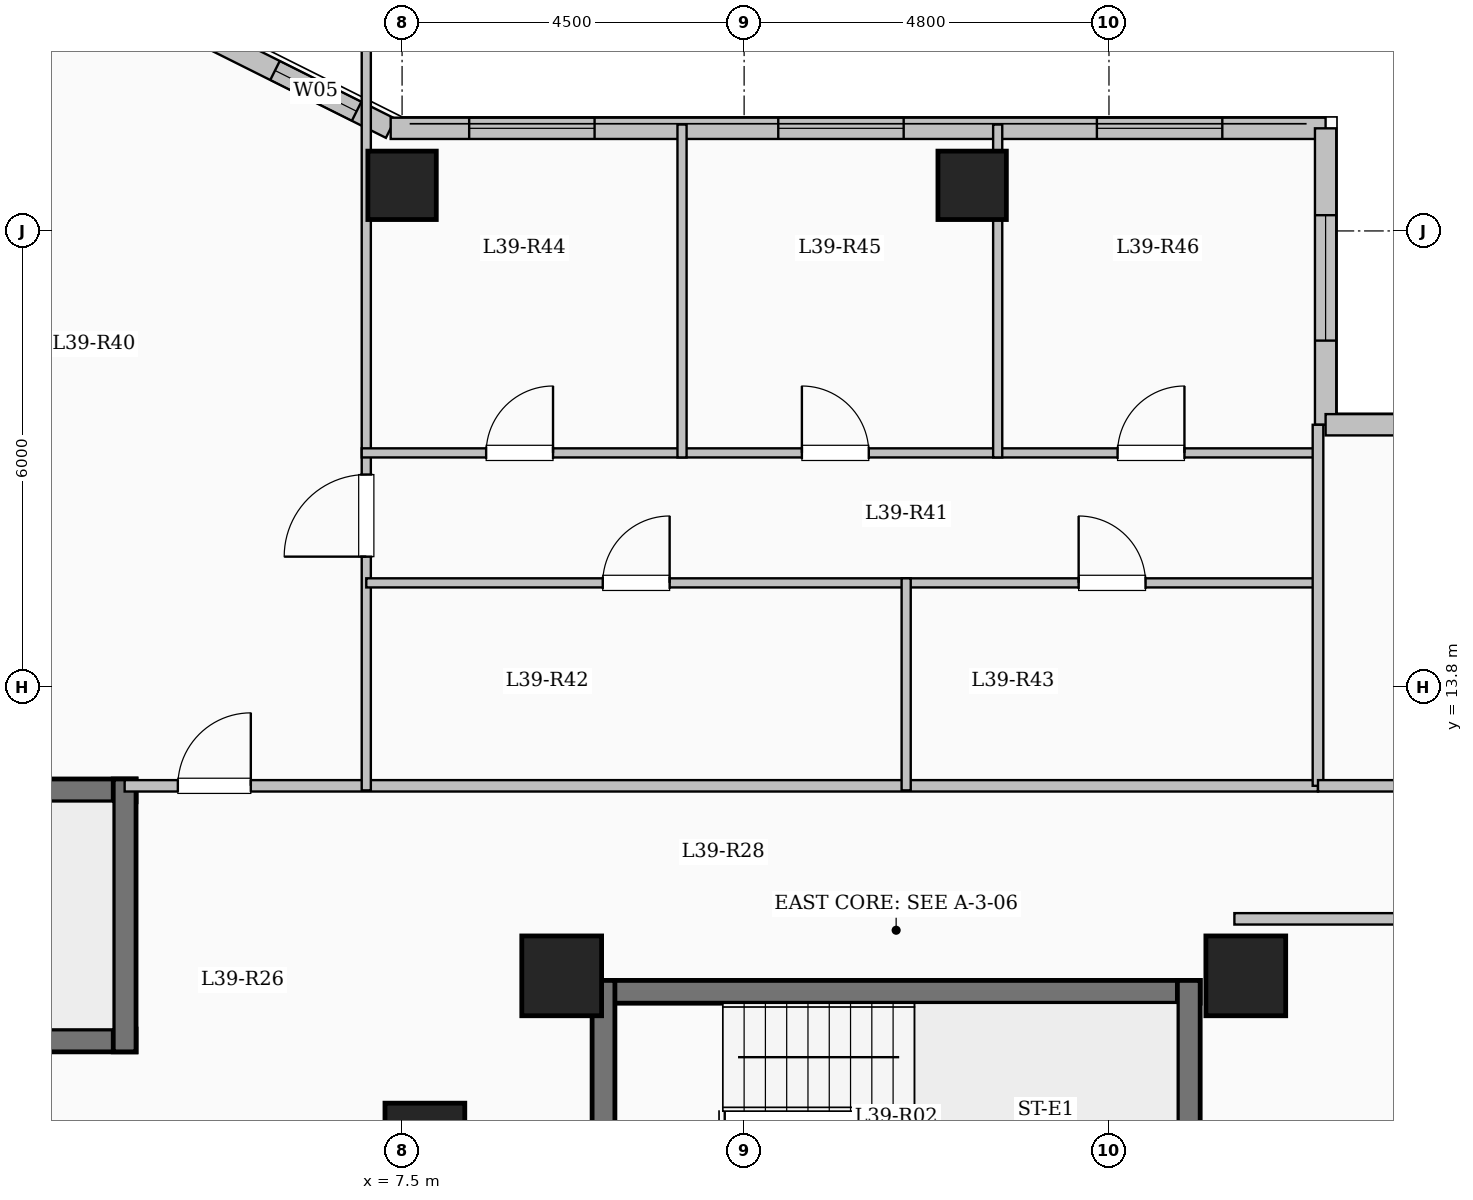
"""IFC4 building model, lengths in metres.
Left out: names, types, materials, properties, quantities, classifications, styles, units other than length and angle.
Written with IfcOpenShell. Run it as: python <this file> out.ifc"""

import sys

from ifc_helpers import new_model, si_unit, direction, frame, frame_2d, origin, origin_2d, place, context, subcontext, project, spatial, rectangle, extrude, element, fill, save


model = new_model("IFC4")
c1 = context("Model", 3, precision=1e-05, world=origin(), true_north=direction((0.0, 1.0)))
c2 = subcontext(c1, "Body", "Model", "MODEL_VIEW")
j1 = project(units=[si_unit("LENGTHUNIT", "METRE"), si_unit("PLANEANGLEUNIT", "RADIAN")], contexts=[c1])
p1 = place(None, origin())
s1 = spatial("IfcSite", under=j1, at=p1, CompositionType="ELEMENT")
p2 = place(p1, origin())
s2 = spatial("IfcBuilding", under=s1, at=p2, CompositionType="ELEMENT")
p3 = place(p2, frame((0.0, 0.0, 146.0)))
s3 = spatial("IfcBuildingStorey", under=s2, at=p3, CompositionType="ELEMENT", Elevation=146.0)
for number, where, z_axis, x_axis in (
    (1, (7.8, 7.8, 0.0), (0.0, 0.0, 1.0), (1.0, 0.0, 0.0)),
    (2, (9.6, 10.0, 0.0), (0.0, 0.0, 1.0), (1.0, 0.0, 0.0)),
    (3, (18.6, 10.0, 0.0), (0.0, 0.0, 1.0), (1.0, 0.0, 0.0)),
):
    element("IfcColumn", number, at=place(p3, frame(where, z_axis=z_axis, x_axis=x_axis)), inside=s3, PredefinedType="COLUMN", context=c2, shape_type="SweptSolid", body=[
        extrude(rectangle(XDim=1.05, YDim=1.05, at=origin_2d()), origin(), (0.0, 0.0, 1.0), 3.35),
    ])
for number, where, z_axis, x_axis in (
    (4, (7.5, 20.4, 0.0), (0.0, 0.0, 1.0), (1.0, 0.0, 0.0)),
    (5, (15.0, 20.4, 0.0), (0.0, 0.0, 1.0), (1.0, 0.0, 0.0)),
):
    element("IfcColumn", number, at=place(p3, frame(where, z_axis=z_axis, x_axis=x_axis)), inside=s3, PredefinedType="COLUMN", context=c2, shape_type="SweptSolid", body=[
        extrude(rectangle(XDim=0.9, YDim=0.9, at=origin_2d()), origin(), (0.0, 0.0, 1.0), 3.35),
    ])
p4 = place(p3, frame((4.35, 22.65, 0.0), z_axis=(0.0, 0.0, 1.0), x_axis=(0.894427191, -0.4472135955, 0.0)))
e6 = element("IfcWall", 6, at=p4, inside=s3, PredefinedType="SOLIDWALL", context=c2, shape_type="SweptSolid", body=[
    extrude(rectangle(XDim=3.354, YDim=0.28, at=frame_2d((1.677, 0.0))), origin(), (0.0, 0.0, 1.0), 3.1),
])
p5 = place(p4, frame((1.653, 0.0, 0.95)))
e7 = element("IfcOpeningElement", 7, at=p5, cuts=e6, PredefinedType="OPENING", context=c2, shape_type="SweptSolid", body=[
    extrude(rectangle(XDim=1.2, YDim=1.5, at=frame_2d((0.6, 0.75))), frame((0.0, 0.15, 0.0), z_axis=(0.0, -1.0, 0.0), x_axis=(1.0, 0.0, 0.0)), (0.0, 0.0, 1.0), 0.3),
])
p6 = place(p3, frame((7.35, 21.15, 0.0), z_axis=(0.0, 0.0, 1.0), x_axis=(1.0, 0.0, 0.0)))
e8 = element("IfcWall", 8, at=p6, inside=s3, PredefinedType="SOLIDWALL", context=c2, shape_type="SweptSolid", body=[
    extrude(rectangle(XDim=12.3, YDim=0.28, at=frame_2d((6.15, 0.0))), origin(), (0.0, 0.0, 1.0), 3.1),
])
p7 = place(p6, frame((1.033, 0.0, 0.9)))
e9 = element("IfcOpeningElement", 9, at=p7, cuts=e8, PredefinedType="OPENING", context=c2, shape_type="SweptSolid", body=[
    extrude(rectangle(XDim=1.65, YDim=1.6, at=frame_2d((0.825, 0.8))), frame((0.0, 0.15, 0.0), z_axis=(0.0, -1.0, 0.0), x_axis=(1.0, 0.0, 0.0)), (0.0, 0.0, 1.0), 0.3),
])
p8 = place(p6, frame((5.099, 0.0, 0.9)))
e10 = element("IfcOpeningElement", 10, at=p8, cuts=e8, PredefinedType="OPENING", context=c2, shape_type="SweptSolid", body=[
    extrude(rectangle(XDim=1.65, YDim=1.6, at=frame_2d((0.825, 0.8))), frame((0.0, 0.15, 0.0), z_axis=(0.0, -1.0, 0.0), x_axis=(1.0, 0.0, 0.0)), (0.0, 0.0, 1.0), 0.3),
])
p9 = place(p6, frame((9.291, 0.0, 0.9)))
e11 = element("IfcOpeningElement", 11, at=p9, cuts=e8, PredefinedType="OPENING", context=c2, shape_type="SweptSolid", body=[
    extrude(rectangle(XDim=1.65, YDim=1.6, at=frame_2d((0.825, 0.8))), frame((0.0, 0.15, 0.0), z_axis=(0.0, -1.0, 0.0), x_axis=(1.0, 0.0, 0.0)), (0.0, 0.0, 1.0), 0.3),
])
p10 = place(p3, frame((19.65, 21.15, 0.0), z_axis=(0.0, 0.0, 1.0), x_axis=(0.0, -1.0, 0.0)))
e12 = element("IfcWall", 12, at=p10, inside=s3, PredefinedType="SOLIDWALL", context=c2, shape_type="SweptSolid", body=[
    extrude(rectangle(XDim=3.9, YDim=0.28, at=frame_2d((1.95, 0.0))), origin(), (0.0, 0.0, 1.0), 3.1),
])
p11 = place(p10, frame((1.143, 0.0, 0.9)))
e13 = element("IfcOpeningElement", 13, at=p11, cuts=e12, PredefinedType="OPENING", context=c2, shape_type="SweptSolid", body=[
    extrude(rectangle(XDim=1.65, YDim=1.6, at=frame_2d((0.825, 0.8))), frame((0.0, 0.15, 0.0), z_axis=(0.0, -1.0, 0.0), x_axis=(1.0, 0.0, 0.0)), (0.0, 0.0, 1.0), 0.3),
])
p12 = place(p3, frame((19.65, 17.25, 0.0), z_axis=(0.0, 0.0, 1.0), x_axis=(1.0, 0.0, 0.0)))
e14 = element("IfcWall", 14, at=p12, inside=s3, PredefinedType="SOLIDWALL", context=c2, shape_type="SweptSolid", body=[
    extrude(rectangle(XDim=5.4, YDim=0.28, at=frame_2d((2.7, 0.0))), origin(), (0.0, 0.0, 1.0), 3.1),
])
p13 = place(p12, frame((1.675, 0.0, 0.9)))
e15 = element("IfcOpeningElement", 15, at=p13, cuts=e14, PredefinedType="OPENING", context=c2, shape_type="SweptSolid", body=[
    extrude(rectangle(XDim=2.0, YDim=1.7, at=frame_2d((1.0, 0.85))), frame((0.0, 0.15, 0.0), z_axis=(0.0, -1.0, 0.0), x_axis=(1.0, 0.0, 0.0)), (0.0, 0.0, 1.0), 0.3),
])
p14 = place(p3, frame((10.0, 9.79, 0.0), z_axis=(0.0, 0.0, 1.0), x_axis=(1.0, 0.0, 0.0)))
e16 = element("IfcWall", 16, at=p14, inside=s3, PredefinedType="SHEAR", context=c2, shape_type="SweptSolid", body=[
    extrude(rectangle(XDim=8.0, YDim=0.3, at=frame_2d((4.0, 0.0))), origin(), (0.0, 0.0, 1.0), 3.35),
])
for number, where, z_axis, x_axis in (
    (17, (10.15, 6.35, 0.0), (0.0, 0.0, 1.0), (0.0, 1.0, 0.0)),
    (18, (17.85, 6.35, 0.0), (0.0, 0.0, 1.0), (0.0, 1.0, 0.0)),
):
    element("IfcWall", number, at=place(p3, frame(where, z_axis=z_axis, x_axis=x_axis)), inside=s3, PredefinedType="SHEAR", context=c2, shape_type="SweptSolid", body=[
        extrude(rectangle(XDim=3.59, YDim=0.3, at=frame_2d((1.795, 0.0))), origin(), (0.0, 0.0, 1.0), 3.35),
    ])
p15 = place(p3, frame((-4.0, 12.44, 0.0), z_axis=(0.0, 0.0, 1.0), x_axis=(1.0, 0.0, 0.0)))
e19 = element("IfcWall", 19, at=p15, inside=s3, PredefinedType="SHEAR", context=c2, shape_type="SweptSolid", body=[
    extrude(rectangle(XDim=8.0, YDim=0.3, at=frame_2d((4.0, 0.0))), origin(), (0.0, 0.0, 1.0), 3.35),
])
p16 = place(p3, frame((-4.0, 9.15, 0.0), z_axis=(0.0, 0.0, 1.0), x_axis=(1.0, 0.0, 0.0)))
e20 = element("IfcWall", 20, at=p16, inside=s3, PredefinedType="SHEAR", context=c2, shape_type="SweptSolid", body=[
    extrude(rectangle(XDim=8.0, YDim=0.3, at=frame_2d((4.0, 0.0))), origin(), (0.0, 0.0, 1.0), 3.35),
])
p17 = place(p16, frame((0.55, 0.0, 0.0)))
e21 = element("IfcOpeningElement", 21, at=p17, cuts=e20, PredefinedType="OPENING", context=c2, shape_type="SweptSolid", body=[
    extrude(rectangle(XDim=1.0, YDim=2.15, at=frame_2d((0.5, 1.075))), frame((0.0, 0.16, 0.0), z_axis=(0.0, -1.0, 0.0), x_axis=(1.0, 0.0, 0.0)), (0.0, 0.0, 1.0), 0.32),
])
p18 = place(p3, frame((3.85, 9.0, 0.0), z_axis=(0.0, 0.0, 1.0), x_axis=(0.0, 1.0, 0.0)))
e22 = element("IfcWall", 22, at=p18, inside=s3, PredefinedType="SHEAR", context=c2, shape_type="SweptSolid", body=[
    extrude(rectangle(XDim=3.59, YDim=0.3, at=frame_2d((1.795, 0.0))), origin(), (0.0, 0.0, 1.0), 3.35),
])
p19 = place(p3, frame((3.85, 12.5, 0.0), z_axis=(0.0, 0.0, 1.0), x_axis=(1.0, 0.0, 0.0)))
e23 = element("IfcWall", 23, at=p19, inside=s3, PredefinedType="PARTITIONING", context=c2, shape_type="SweptSolid", body=[
    extrude(rectangle(XDim=15.7, YDim=0.15, at=frame_2d((7.85, 0.0))), origin(), (0.0, 0.0, 1.0), 3.1),
])
p20 = place(p19, frame((0.7, 0.0, 0.0)))
e24 = element("IfcOpeningElement", 24, at=p20, cuts=e23, PredefinedType="OPENING", context=c2, shape_type="SweptSolid", body=[
    extrude(rectangle(XDim=0.96, YDim=2.15, at=frame_2d((0.48, 1.075))), frame((0.0, 0.085, 0.0), z_axis=(0.0, -1.0, 0.0), x_axis=(1.0, 0.0, 0.0)), (0.0, 0.0, 1.0), 0.17),
])
p21 = place(p3, frame((7.029, 12.44, 0.0), z_axis=(0.0, 0.0, 1.0), x_axis=(0.0, 1.0, 0.0)))
e25 = element("IfcWall", 25, at=p21, inside=s3, PredefinedType="PARTITIONING", context=c2, shape_type="SweptSolid", body=[
    extrude(rectangle(XDim=9.74, YDim=0.12, at=frame_2d((4.87, 0.0))), origin(), (0.0, 0.0, 1.0), 3.1),
])
p22 = place(p21, frame((3.075, 0.0, 0.0)))
e26 = element("IfcOpeningElement", 26, at=p22, cuts=e25, PredefinedType="OPENING", context=c2, shape_type="SweptSolid", body=[
    extrude(rectangle(XDim=1.08, YDim=2.15, at=frame_2d((0.54, 1.075))), frame((0.0, 0.07, 0.0), z_axis=(0.0, -1.0, 0.0), x_axis=(1.0, 0.0, 0.0)), (0.0, 0.0, 1.0), 0.14),
])
p23 = place(p3, frame((7.029, 15.17, 0.0), z_axis=(0.0, 0.0, 1.0), x_axis=(1.0, 0.0, 0.0)))
e27 = element("IfcWall", 27, at=p23, inside=s3, PredefinedType="PARTITIONING", context=c2, shape_type="SweptSolid", body=[
    extrude(rectangle(XDim=7.103, YDim=0.12, at=frame_2d((3.552, 0.0))), origin(), (0.0, 0.0, 1.0), 3.1),
])
p24 = place(p23, frame((3.111, 0.0, 0.0)))
e28 = element("IfcOpeningElement", 28, at=p24, cuts=e27, PredefinedType="OPENING", context=c2, shape_type="SweptSolid", body=[
    extrude(rectangle(XDim=0.88, YDim=2.1, at=frame_2d((0.44, 1.05))), frame((0.0, 0.07, 0.0), z_axis=(0.0, -1.0, 0.0), x_axis=(1.0, 0.0, 0.0)), (0.0, 0.0, 1.0), 0.14),
])
p25 = place(p3, frame((14.132, 15.17, 0.0), z_axis=(0.0, 0.0, 1.0), x_axis=(1.0, 0.0, 0.0)))
e29 = element("IfcWall", 29, at=p25, inside=s3, PredefinedType="PARTITIONING", context=c2, shape_type="SweptSolid", body=[
    extrude(rectangle(XDim=5.418, YDim=0.12, at=frame_2d((2.709, 0.0))), origin(), (0.0, 0.0, 1.0), 3.1),
])
p26 = place(p25, frame((2.269, 0.0, 0.0)))
e30 = element("IfcOpeningElement", 30, at=p26, cuts=e29, PredefinedType="OPENING", context=c2, shape_type="SweptSolid", body=[
    extrude(rectangle(XDim=0.88, YDim=2.1, at=frame_2d((0.44, 1.05))), frame((0.0, 0.07, 0.0), z_axis=(0.0, -1.0, 0.0), x_axis=(1.0, 0.0, 0.0)), (0.0, 0.0, 1.0), 0.14),
])
p27 = place(p3, frame((6.969, 16.88, 0.0), z_axis=(0.0, 0.0, 1.0), x_axis=(1.0, 0.0, 0.0)))
e31 = element("IfcWall", 31, at=p27, inside=s3, PredefinedType="PARTITIONING", context=c2, shape_type="SweptSolid", body=[
    extrude(rectangle(XDim=12.641, YDim=0.12, at=frame_2d((6.321, 0.0))), origin(), (0.0, 0.0, 1.0), 2.685),
])
p28 = place(p27, frame((1.637, 0.0, 0.0)))
e32 = element("IfcOpeningElement", 32, at=p28, cuts=e31, PredefinedType="OPENING", context=c2, shape_type="SweptSolid", body=[
    extrude(rectangle(XDim=0.88, YDim=2.1, at=frame_2d((0.44, 1.05))), frame((0.0, 0.07, 0.0), z_axis=(0.0, -1.0, 0.0), x_axis=(1.0, 0.0, 0.0)), (0.0, 0.0, 1.0), 0.14),
])
p29 = place(p27, frame((5.791, 0.0, 0.0)))
e33 = element("IfcOpeningElement", 33, at=p29, cuts=e31, PredefinedType="OPENING", context=c2, shape_type="SweptSolid", body=[
    extrude(rectangle(XDim=0.88, YDim=2.1, at=frame_2d((0.44, 1.05))), frame((0.0, 0.07, 0.0), z_axis=(0.0, -1.0, 0.0), x_axis=(1.0, 0.0, 0.0)), (0.0, 0.0, 1.0), 0.14),
])
p30 = place(p27, frame((9.944, 0.0, 0.0)))
e34 = element("IfcOpeningElement", 34, at=p30, cuts=e31, PredefinedType="OPENING", context=c2, shape_type="SweptSolid", body=[
    extrude(rectangle(XDim=0.88, YDim=2.1, at=frame_2d((0.44, 1.05))), frame((0.0, 0.07, 0.0), z_axis=(0.0, -1.0, 0.0), x_axis=(1.0, 0.0, 0.0)), (0.0, 0.0, 1.0), 0.14),
])
p31 = place(p3, frame((14.132, 12.44, 0.0), z_axis=(0.0, 0.0, 1.0), x_axis=(0.0, 1.0, 0.0)))
e35 = element("IfcWall", 35, at=p31, inside=s3, PredefinedType="PARTITIONING", context=c2, shape_type="SweptSolid", body=[
    extrude(rectangle(XDim=2.79, YDim=0.12, at=frame_2d((1.395, 0.0))), origin(), (0.0, 0.0, 1.0), 3.1),
])
for number, where, z_axis, x_axis in (
    (36, (11.183, 16.82, 0.0), (0.0, 0.0, 1.0), (0.0, 1.0, 0.0)),
    (37, (15.336, 16.82, 0.0), (0.0, 0.0, 1.0), (0.0, 1.0, 0.0)),
):
    element("IfcWall", number, at=place(p3, frame(where, z_axis=z_axis, x_axis=x_axis)), inside=s3, PredefinedType="PARTITIONING", context=c2, shape_type="SweptSolid", body=[
        extrude(rectangle(XDim=4.38, YDim=0.12, at=frame_2d((2.19, 0.0))), origin(), (0.0, 0.0, 1.0), 3.1),
    ])
p32 = place(p3, frame((18.45, 10.75, 0.0), z_axis=(0.0, 0.0, 1.0), x_axis=(1.0, 0.0, 0.0)))
e38 = element("IfcWall", 38, at=p32, inside=s3, PredefinedType="PARTITIONING", context=c2, shape_type="SweptSolid", body=[
    extrude(rectangle(XDim=6.63, YDim=0.15, at=frame_2d((3.315, 0.0))), origin(), (0.0, 0.0, 1.0), 3.1),
])
p33 = place(p3, frame((19.55, 12.5, 0.0), z_axis=(0.0, 0.0, 1.0), x_axis=(0.0, 1.0, 0.0)))
e39 = element("IfcWall", 39, at=p33, inside=s3, PredefinedType="PARTITIONING", context=c2, shape_type="SweptSolid", body=[
    extrude(rectangle(XDim=4.75, YDim=0.14, at=frame_2d((2.375, 0.0))), origin(), (0.0, 0.0, 1.0), 3.1),
])
p34 = place(p3, frame((19.55, 12.5, 0.0), z_axis=(0.0, 0.0, 1.0), x_axis=(1.0, 0.0, 0.0)))
e40 = element("IfcWall", 40, at=p34, inside=s3, PredefinedType="PARTITIONING", context=c2, shape_type="SweptSolid", body=[
    extrude(rectangle(XDim=5.53, YDim=0.15, at=frame_2d((2.765, 0.0))), origin(), (0.0, 0.0, 1.0), 3.1),
])
p35 = place(p34, frame((2.29, 0.0, 0.0)))
e41 = element("IfcOpeningElement", 41, at=p35, cuts=e40, PredefinedType="OPENING", context=c2, shape_type="SweptSolid", body=[
    extrude(rectangle(XDim=0.95, YDim=2.15, at=frame_2d((0.475, 1.075))), frame((0.0, 0.085, 0.0), z_axis=(0.0, -1.0, 0.0), x_axis=(1.0, 0.0, 0.0)), (0.0, 0.0, 1.0), 0.17),
])
p36 = place(p5, origin())
e42 = element("IfcWindow", 42, at=p36, inside=s3, PartitioningType="SINGLE_PANEL", PredefinedType="WINDOW", context=c2, shape_type="SweptSolid", body=[
    extrude(rectangle(XDim=1.2, YDim=1.5, at=frame_2d((0.6, 0.75))), frame((0.0, 0.03, 0.0), z_axis=(0.0, -1.0, 0.0), x_axis=(1.0, 0.0, 0.0)), (0.0, 0.0, 1.0), 0.06),
])
fill(e7, e42)
p37 = place(p7, origin())
e43 = element("IfcWindow", 43, at=p37, inside=s3, PartitioningType="SINGLE_PANEL", PredefinedType="WINDOW", context=c2, shape_type="SweptSolid", body=[
    extrude(rectangle(XDim=1.65, YDim=1.6, at=frame_2d((0.825, 0.8))), frame((0.0, 0.03, 0.0), z_axis=(0.0, -1.0, 0.0), x_axis=(1.0, 0.0, 0.0)), (0.0, 0.0, 1.0), 0.06),
])
fill(e9, e43)
p38 = place(p8, origin())
e44 = element("IfcWindow", 44, at=p38, inside=s3, PartitioningType="SINGLE_PANEL", PredefinedType="WINDOW", context=c2, shape_type="SweptSolid", body=[
    extrude(rectangle(XDim=1.65, YDim=1.6, at=frame_2d((0.825, 0.8))), frame((0.0, 0.03, 0.0), z_axis=(0.0, -1.0, 0.0), x_axis=(1.0, 0.0, 0.0)), (0.0, 0.0, 1.0), 0.06),
])
fill(e10, e44)
p39 = place(p9, origin())
e45 = element("IfcWindow", 45, at=p39, inside=s3, PartitioningType="SINGLE_PANEL", PredefinedType="WINDOW", context=c2, shape_type="SweptSolid", body=[
    extrude(rectangle(XDim=1.65, YDim=1.6, at=frame_2d((0.825, 0.8))), frame((0.0, 0.03, 0.0), z_axis=(0.0, -1.0, 0.0), x_axis=(1.0, 0.0, 0.0)), (0.0, 0.0, 1.0), 0.06),
])
fill(e11, e45)
p40 = place(p11, origin())
e46 = element("IfcWindow", 46, at=p40, inside=s3, PartitioningType="SINGLE_PANEL", PredefinedType="WINDOW", context=c2, shape_type="SweptSolid", body=[
    extrude(rectangle(XDim=1.65, YDim=1.6, at=frame_2d((0.825, 0.8))), frame((0.0, 0.03, 0.0), z_axis=(0.0, -1.0, 0.0), x_axis=(1.0, 0.0, 0.0)), (0.0, 0.0, 1.0), 0.06),
])
fill(e13, e46)
p41 = place(p20, origin())
e47 = element("IfcDoor", 47, at=p41, inside=s3, OperationType="SINGLE_SWING_RIGHT", PredefinedType="DOOR", context=c2, shape_type="SweptSolid", body=[
    extrude(rectangle(XDim=0.96, YDim=2.15, at=frame_2d((0.48, 1.075))), frame((0.0, 0.025, 0.0), z_axis=(0.0, -1.0, 0.0), x_axis=(1.0, 0.0, 0.0)), (0.0, 0.0, 1.0), 0.05),
])
fill(e24, e47)
p42 = place(p22, origin())
e48 = element("IfcDoor", 48, at=p42, inside=s3, OperationType="SINGLE_SWING_LEFT", PredefinedType="DOOR", context=c2, shape_type="SweptSolid", body=[
    extrude(rectangle(XDim=1.08, YDim=2.15, at=frame_2d((0.54, 1.075))), frame((0.0, 0.025, 0.0), z_axis=(0.0, -1.0, 0.0), x_axis=(1.0, 0.0, 0.0)), (0.0, 0.0, 1.0), 0.05),
])
fill(e26, e48)
p43 = place(p24, origin())
e49 = element("IfcDoor", 49, at=p43, inside=s3, OperationType="SINGLE_SWING_RIGHT", PredefinedType="DOOR", context=c2, shape_type="SweptSolid", body=[
    extrude(rectangle(XDim=0.88, YDim=2.1, at=frame_2d((0.44, 1.05))), frame((0.0, 0.025, 0.0), z_axis=(0.0, -1.0, 0.0), x_axis=(1.0, 0.0, 0.0)), (0.0, 0.0, 1.0), 0.05),
])
fill(e28, e49)
p44 = place(p26, origin())
e50 = element("IfcDoor", 50, at=p44, inside=s3, OperationType="SINGLE_SWING_LEFT", PredefinedType="DOOR", context=c2, shape_type="SweptSolid", body=[
    extrude(rectangle(XDim=0.88, YDim=2.1, at=frame_2d((0.44, 1.05))), frame((0.0, 0.025, 0.0), z_axis=(0.0, -1.0, 0.0), x_axis=(1.0, 0.0, 0.0)), (0.0, 0.0, 1.0), 0.05),
])
fill(e30, e50)
p45 = place(p28, origin())
e51 = element("IfcDoor", 51, at=p45, inside=s3, OperationType="SINGLE_SWING_RIGHT", PredefinedType="DOOR", context=c2, shape_type="SweptSolid", body=[
    extrude(rectangle(XDim=0.88, YDim=2.1, at=frame_2d((0.44, 1.05))), frame((0.0, 0.025, 0.0), z_axis=(0.0, -1.0, 0.0), x_axis=(1.0, 0.0, 0.0)), (0.0, 0.0, 1.0), 0.05),
])
fill(e32, e51)
p46 = place(p29, origin())
e52 = element("IfcDoor", 52, at=p46, inside=s3, OperationType="SINGLE_SWING_LEFT", PredefinedType="DOOR", context=c2, shape_type="SweptSolid", body=[
    extrude(rectangle(XDim=0.88, YDim=2.1, at=frame_2d((0.44, 1.05))), frame((0.0, 0.025, 0.0), z_axis=(0.0, -1.0, 0.0), x_axis=(1.0, 0.0, 0.0)), (0.0, 0.0, 1.0), 0.05),
])
fill(e33, e52)
p47 = place(p30, origin())
e53 = element("IfcDoor", 53, at=p47, inside=s3, OperationType="SINGLE_SWING_RIGHT", PredefinedType="DOOR", context=c2, shape_type="SweptSolid", body=[
    extrude(rectangle(XDim=0.88, YDim=2.1, at=frame_2d((0.44, 1.05))), frame((0.0, 0.025, 0.0), z_axis=(0.0, -1.0, 0.0), x_axis=(1.0, 0.0, 0.0)), (0.0, 0.0, 1.0), 0.05),
])
fill(e34, e53)
save(model, sys.argv[1])
